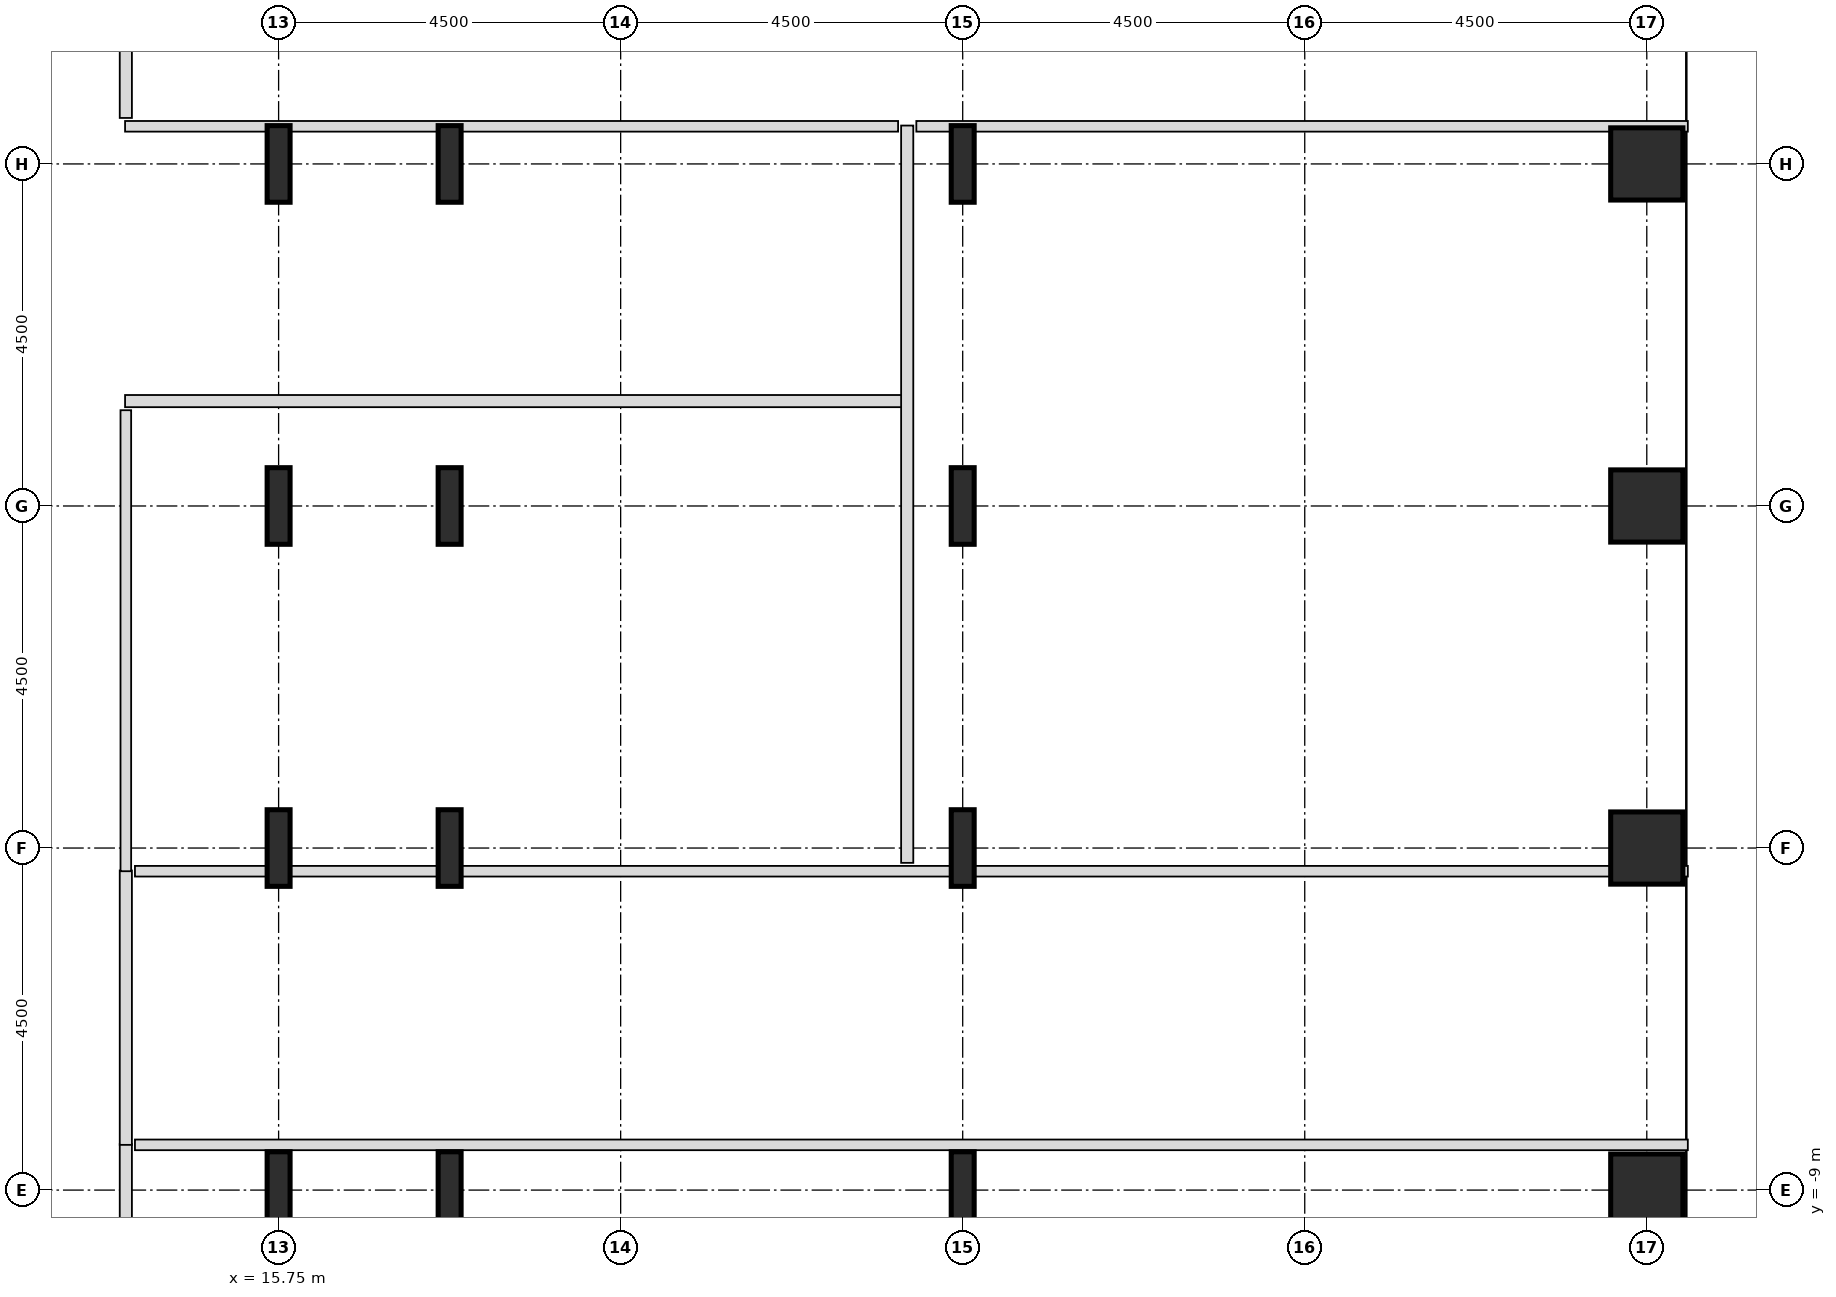
"""IFC4 building model, lengths in metres.
Left out: names, types, materials, properties, quantities, classifications, styles, units other than length and angle.
Written with IfcOpenShell. Run it as: python <this file> out.ifc"""

import sys

from ifc_helpers import new_model, si_unit, direction, frame, frame_2d, origin, origin_2d, place, context, subcontext, project, spatial, rectangle, hollow_rectangle, i_section, extrude, source, transform, mapped, element, fill, save


model = new_model("IFC4")
c1 = context("Model", 3, precision=1e-05, world=origin(), true_north=direction((0.0, 1.0)))
c2 = subcontext(c1, "Body", "Model", "MODEL_VIEW")
j1 = project(units=[si_unit("LENGTHUNIT", "METRE"), si_unit("PLANEANGLEUNIT", "RADIAN")], contexts=[c1])
p1 = place(None, origin())
s1 = spatial("IfcSite", under=j1, at=p1, CompositionType="ELEMENT")
p2 = place(p1, origin())
s2 = spatial("IfcBuilding", under=s1, at=p2, CompositionType="ELEMENT")
p3 = place(p2, frame((0.0, 0.0, 40.6)))
s3 = spatial("IfcBuildingStorey", under=s2, at=p3, CompositionType="ELEMENT", Elevation=40.6)
m1 = source(origin(), c2, "Body", "SweptSolid", [
    extrude(i_section(OverallWidth=0.302, OverallDepth=1.008, WebThickness=0.021, FlangeThickness=0.04, FilletRadius=0.03, at=origin_2d()), origin(), (0.0, 0.0, 1.0), 3.8),
])
for number, where, z_axis, x_axis in (
    (1, (15.75, -9.0, 0.0), (0.0, 0.0, 1.0), (1.0, 0.0, 0.0)),
    (2, (15.75, -4.5, 0.0), (0.0, 0.0, 1.0), (1.0, 0.0, 0.0)),
    (3, (15.75, 0.0, 0.0), (0.0, 0.0, 1.0), (1.0, 0.0, 0.0)),
    (4, (15.75, 4.5, 0.0), (0.0, 0.0, 1.0), (1.0, 0.0, 0.0)),
    (5, (18.0, -9.0, 0.0), (0.0, 0.0, 1.0), (1.0, 0.0, 0.0)),
    (6, (18.0, -4.5, 0.0), (0.0, 0.0, 1.0), (1.0, 0.0, 0.0)),
    (7, (18.0, 0.0, 0.0), (0.0, 0.0, 1.0), (1.0, 0.0, 0.0)),
    (8, (18.0, 4.5, 0.0), (0.0, 0.0, 1.0), (1.0, 0.0, 0.0)),
    (9, (24.75, -9.0, 0.0), (0.0, 0.0, 1.0), (1.0, 0.0, 0.0)),
    (10, (24.75, -4.5, 0.0), (0.0, 0.0, 1.0), (1.0, 0.0, 0.0)),
    (11, (24.75, 0.0, 0.0), (0.0, 0.0, 1.0), (1.0, 0.0, 0.0)),
    (12, (24.75, 4.5, 0.0), (0.0, 0.0, 1.0), (1.0, 0.0, 0.0)),
):
    element("IfcColumn", number, at=place(p3, frame(where, z_axis=z_axis, x_axis=x_axis)), inside=s3, PredefinedType="COLUMN", context=c2, shape_type="MappedRepresentation", body=[
        mapped(m1, transform((0.0, 0.0, 0.0), x_axis=(1.0, 0.0, 0.0), y_axis=(0.0, 1.0, 0.0), z_axis=(0.0, 0.0, 1.0), scale=1.0)),
    ])
m2 = source(origin(), c2, "Body", "SweptSolid", [
    extrude(hollow_rectangle(XDim=0.95, YDim=0.95, WallThickness=0.045, InnerFilletRadius=0.045, OuterFilletRadius=0.09, at=origin_2d()), origin(), (0.0, 0.0, 1.0), 3.8),
])
for number, where, z_axis, x_axis in (
    (13, (33.75, -9.0, 0.0), (0.0, 0.0, 1.0), (1.0, 0.0, 0.0)),
    (14, (33.75, -4.5, 0.0), (0.0, 0.0, 1.0), (1.0, 0.0, 0.0)),
    (15, (33.75, 0.0, 0.0), (0.0, 0.0, 1.0), (1.0, 0.0, 0.0)),
    (16, (33.75, 4.5, 0.0), (0.0, 0.0, 1.0), (1.0, 0.0, 0.0)),
):
    element("IfcColumn", number, at=place(p3, frame(where, z_axis=z_axis, x_axis=x_axis)), inside=s3, PredefinedType="COLUMN", context=c2, shape_type="MappedRepresentation", body=[
        mapped(m2, transform((0.0, 0.0, 0.0), x_axis=(1.0, 0.0, 0.0), y_axis=(0.0, 1.0, 0.0), z_axis=(0.0, 0.0, 1.0), scale=1.0)),
    ])
m3 = source(origin(), c2, "Body", "SweptSolid", [
    extrude(rectangle(XDim=14.645, YDim=0.16, at=frame_2d((7.323, 0.0))), origin(), (0.0, 0.0, 1.0), 3.535),
])
p4 = place(p3, frame((13.74, -23.04, 0.0), z_axis=(0.0, 0.0, 1.0), x_axis=(0.0, 1.0, 0.0)))
e17 = element("IfcWall", 17, at=p4, inside=s3, PredefinedType="PARTITIONING", context=c2, shape_type="MappedRepresentation", body=[
    mapped(m3, transform((0.0, 0.0, 0.0), x_axis=(1.0, 0.0, 0.0), y_axis=(0.0, 1.0, 0.0), z_axis=(0.0, 0.0, 1.0), scale=1.0)),
])
p5 = place(p4, frame((12.613, 0.0, 0.0)))
e18 = element("IfcOpeningElement", 18, at=p5, cuts=e17, PredefinedType="OPENING", context=c2, shape_type="SweptSolid", body=[
    extrude(rectangle(XDim=0.95, YDim=2.1, at=frame_2d((0.475, 1.05))), frame((0.0, 0.09, 0.0), z_axis=(0.0, -1.0, 0.0), x_axis=(1.0, 0.0, 0.0)), (0.0, 0.0, 1.0), 0.18),
])
m4 = source(origin(), c2, "Body", "SweptSolid", [
    extrude(rectangle(XDim=20.43, YDim=0.14, at=frame_2d((10.215, 0.0))), origin(), (0.0, 0.0, 1.0), 3.535),
])
p6 = place(p3, frame((13.86, -8.405, 0.0), z_axis=(0.0, 0.0, 1.0), x_axis=(1.0, 0.0, 0.0)))
e19 = element("IfcWall", 19, at=p6, inside=s3, PredefinedType="PARTITIONING", context=c2, shape_type="MappedRepresentation", body=[
    mapped(m4, transform((0.0, 0.0, 0.0), x_axis=(1.0, 0.0, 0.0), y_axis=(0.0, 1.0, 0.0), z_axis=(0.0, 0.0, 1.0), scale=1.0)),
])
m5 = source(origin(), c2, "Body", "SweptSolid", [
    extrude(rectangle(XDim=3.61, YDim=0.16, at=frame_2d((1.805, 0.0))), origin(), (0.0, 0.0, 1.0), 3.535),
])
p7 = place(p3, frame((13.74, -8.405, 0.0), z_axis=(0.0, 0.0, 1.0), x_axis=(0.0, 1.0, 0.0)))
e20 = element("IfcWall", 20, at=p7, inside=s3, PredefinedType="PARTITIONING", context=c2, shape_type="MappedRepresentation", body=[
    mapped(m5, transform((0.0, 0.0, 0.0), x_axis=(1.0, 0.0, 0.0), y_axis=(0.0, 1.0, 0.0), z_axis=(0.0, 0.0, 1.0), scale=1.0)),
])
p8 = place(p7, frame((1.33, 0.0, 0.0)))
e21 = element("IfcOpeningElement", 21, at=p8, cuts=e20, PredefinedType="OPENING", context=c2, shape_type="SweptSolid", body=[
    extrude(rectangle(XDim=0.95, YDim=2.1, at=frame_2d((0.475, 1.05))), frame((0.0, 0.09, 0.0), z_axis=(0.0, -1.0, 0.0), x_axis=(1.0, 0.0, 0.0)), (0.0, 0.0, 1.0), 0.18),
])
m6 = source(origin(), c2, "Body", "SweptSolid", [
    extrude(rectangle(XDim=20.43, YDim=0.14, at=frame_2d((10.215, 0.0))), origin(), (0.0, 0.0, 1.0), 2.825),
])
p9 = place(p3, frame((13.86, -4.805, 0.0), z_axis=(0.0, 0.0, 1.0), x_axis=(1.0, 0.0, 0.0)))
e22 = element("IfcWall", 22, at=p9, inside=s3, PredefinedType="PARTITIONING", context=c2, shape_type="MappedRepresentation", body=[
    mapped(m6, transform((0.0, 0.0, 0.0), x_axis=(1.0, 0.0, 0.0), y_axis=(0.0, 1.0, 0.0), z_axis=(0.0, 0.0, 1.0), scale=1.0)),
])
m7 = source(origin(), c2, "Body", "SweptSolid", [
    extrude(rectangle(XDim=10.25, YDim=0.16, at=frame_2d((5.125, 0.0))), origin(), (0.0, 0.0, 1.0), 3.535),
])
p10 = place(p3, frame((13.73, 1.38, 0.0), z_axis=(0.0, 0.0, 1.0), x_axis=(1.0, 0.0, 0.0)))
e23 = element("IfcWall", 23, at=p10, inside=s3, PredefinedType="PARTITIONING", context=c2, shape_type="MappedRepresentation", body=[
    mapped(m7, transform((0.0, 0.0, 0.0), x_axis=(1.0, 0.0, 0.0), y_axis=(0.0, 1.0, 0.0), z_axis=(0.0, 0.0, 1.0), scale=1.0)),
])
p11 = place(p10, frame((4.65, 0.0, 0.0)))
e24 = element("IfcOpeningElement", 24, at=p11, cuts=e23, PredefinedType="OPENING", context=c2, shape_type="SweptSolid", body=[
    extrude(rectangle(XDim=0.95, YDim=2.1, at=frame_2d((0.475, 1.05))), frame((0.0, 0.09, 0.0), z_axis=(0.0, -1.0, 0.0), x_axis=(1.0, 0.0, 0.0)), (0.0, 0.0, 1.0), 0.18),
])
m8 = source(origin(), c2, "Body", "SweptSolid", [
    extrude(rectangle(XDim=6.065, YDim=0.14, at=frame_2d((3.032, 0.0))), origin(), (0.0, 0.0, 1.0), 3.535),
])
p12 = place(p3, frame((13.74, -4.805, 0.0), z_axis=(0.0, 0.0, 1.0), x_axis=(0.0, 1.0, 0.0)))
e25 = element("IfcWall", 25, at=p12, inside=s3, PredefinedType="PARTITIONING", context=c2, shape_type="MappedRepresentation", body=[
    mapped(m8, transform((0.0, 0.0, 0.0), x_axis=(1.0, 0.0, 0.0), y_axis=(0.0, 1.0, 0.0), z_axis=(0.0, 0.0, 1.0), scale=1.0)),
])
m9 = source(origin(), c2, "Body", "SweptSolid", [
    extrude(rectangle(XDim=9.7, YDim=0.16, at=frame_2d((4.85, 0.0))), origin(), (0.0, 0.0, 1.0), 3.535),
])
p13 = place(p3, frame((24.02, -4.695, 0.0), z_axis=(0.0, 0.0, 1.0), x_axis=(0.0, 1.0, 0.0)))
e26 = element("IfcWall", 26, at=p13, inside=s3, PredefinedType="PARTITIONING", context=c2, shape_type="MappedRepresentation", body=[
    mapped(m9, transform((0.0, 0.0, 0.0), x_axis=(1.0, 0.0, 0.0), y_axis=(0.0, 1.0, 0.0), z_axis=(0.0, 0.0, 1.0), scale=1.0)),
])
p14 = place(p13, frame((6.47, 0.0, 0.0)))
e27 = element("IfcOpeningElement", 27, at=p14, cuts=e26, PredefinedType="OPENING", context=c2, shape_type="SweptSolid", body=[
    extrude(rectangle(XDim=0.95, YDim=2.1, at=frame_2d((0.475, 1.05))), frame((0.0, 0.09, 0.0), z_axis=(0.0, -1.0, 0.0), x_axis=(1.0, 0.0, 0.0)), (0.0, 0.0, 1.0), 0.18),
])
m10 = source(origin(), c2, "Body", "SweptSolid", [
    extrude(rectangle(XDim=10.17, YDim=0.14, at=frame_2d((5.085, 0.0))), origin(), (0.0, 0.0, 1.0), 2.825),
])
p15 = place(p3, frame((13.73, 4.995, 0.0), z_axis=(0.0, 0.0, 1.0), x_axis=(1.0, 0.0, 0.0)))
e28 = element("IfcWall", 28, at=p15, inside=s3, PredefinedType="PARTITIONING", context=c2, shape_type="MappedRepresentation", body=[
    mapped(m10, transform((0.0, 0.0, 0.0), x_axis=(1.0, 0.0, 0.0), y_axis=(0.0, 1.0, 0.0), z_axis=(0.0, 0.0, 1.0), scale=1.0)),
])
m11 = source(origin(), c2, "Body", "SweptSolid", [
    extrude(rectangle(XDim=10.15, YDim=0.14, at=frame_2d((5.075, 0.0))), origin(), (0.0, 0.0, 1.0), 2.825),
])
p16 = place(p3, frame((24.14, 4.995, 0.0), z_axis=(0.0, 0.0, 1.0), x_axis=(1.0, 0.0, 0.0)))
e29 = element("IfcWall", 29, at=p16, inside=s3, PredefinedType="PARTITIONING", context=c2, shape_type="MappedRepresentation", body=[
    mapped(m11, transform((0.0, 0.0, 0.0), x_axis=(1.0, 0.0, 0.0), y_axis=(0.0, 1.0, 0.0), z_axis=(0.0, 0.0, 1.0), scale=1.0)),
])
m12 = source(origin(), c2, "Body", "SweptSolid", [
    extrude(rectangle(XDim=3.4, YDim=0.16, at=frame_2d((1.7, 0.0))), origin(), (0.0, 0.0, 1.0), 3.535),
])
p17 = place(p3, frame((13.74, 5.105, 0.0), z_axis=(0.0, 0.0, 1.0), x_axis=(0.0, 1.0, 0.0)))
e30 = element("IfcWall", 30, at=p17, inside=s3, PredefinedType="PARTITIONING", context=c2, shape_type="MappedRepresentation", body=[
    mapped(m12, transform((0.0, 0.0, 0.0), x_axis=(1.0, 0.0, 0.0), y_axis=(0.0, 1.0, 0.0), z_axis=(0.0, 0.0, 1.0), scale=1.0)),
])
p18 = place(p17, frame((1.225, 0.0, 0.0)))
e31 = element("IfcOpeningElement", 31, at=p18, cuts=e30, PredefinedType="OPENING", context=c2, shape_type="SweptSolid", body=[
    extrude(rectangle(XDim=0.95, YDim=2.1, at=frame_2d((0.475, 1.05))), frame((0.0, 0.09, 0.0), z_axis=(0.0, -1.0, 0.0), x_axis=(1.0, 0.0, 0.0)), (0.0, 0.0, 1.0), 0.18),
])
m13 = source(origin(), c2, "Body", "SweptSolid", [
    extrude(rectangle(XDim=0.95, YDim=2.1, at=frame_2d((0.475, 1.05))), frame((0.0, 0.025, 0.0), z_axis=(0.0, -1.0, 0.0), x_axis=(1.0, 0.0, 0.0)), (0.0, 0.0, 1.0), 0.05),
])
p19 = place(p8, origin())
e32 = element("IfcDoor", 32, at=p19, inside=s3, OperationType="SINGLE_SWING_RIGHT", PredefinedType="DOOR", context=c2, shape_type="MappedRepresentation", body=[
    mapped(m13, transform((0.0, 0.0, 0.0), x_axis=(1.0, 0.0, 0.0), y_axis=(0.0, 1.0, 0.0), z_axis=(0.0, 0.0, 1.0), scale=1.0)),
])
fill(e21, e32)
p20 = place(p11, origin())
e33 = element("IfcDoor", 33, at=p20, inside=s3, OperationType="SINGLE_SWING_LEFT", PredefinedType="DOOR", context=c2, shape_type="MappedRepresentation", body=[
    mapped(m13, transform((0.0, 0.0, 0.0), x_axis=(1.0, 0.0, 0.0), y_axis=(0.0, 1.0, 0.0), z_axis=(0.0, 0.0, 1.0), scale=1.0)),
])
fill(e24, e33)
p21 = place(p14, origin())
e34 = element("IfcDoor", 34, at=p21, inside=s3, OperationType="SINGLE_SWING_RIGHT", PredefinedType="DOOR", context=c2, shape_type="MappedRepresentation", body=[
    mapped(m13, transform((0.0, 0.0, 0.0), x_axis=(1.0, 0.0, 0.0), y_axis=(0.0, 1.0, 0.0), z_axis=(0.0, 0.0, 1.0), scale=1.0)),
])
fill(e27, e34)
save(model, sys.argv[1])
